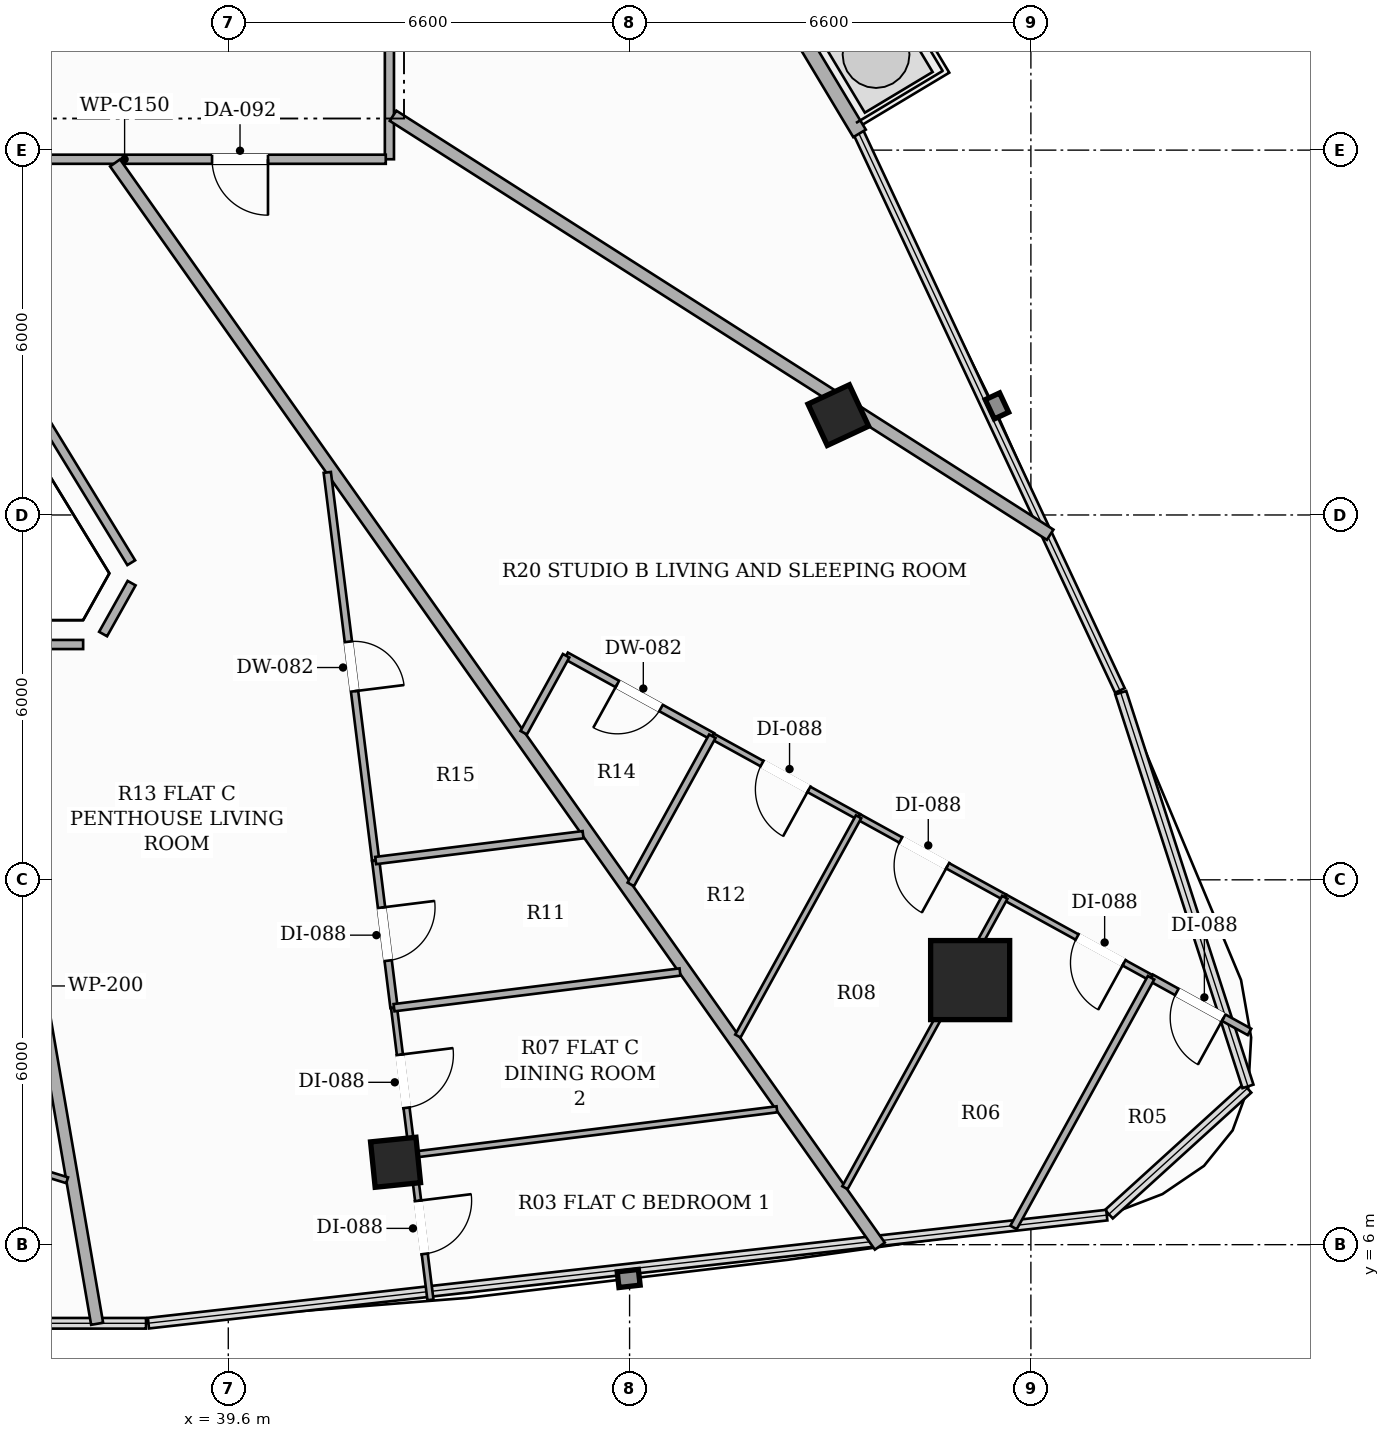
"""IFC4 building model, lengths in metres.
Left out: names, types, materials, properties, quantities, classifications, styles, units other than length and angle.
Written with IfcOpenShell. Run it as: python <this file> out.ifc"""

import sys

from ifc_helpers import new_model, si_unit, direction, frame, frame_2d, origin, origin_2d, place, context, subcontext, project, spatial, rectangle, hollow_rectangle, extrude, element, fill, save


model = new_model("IFC4")
c1 = context("Model", 3, precision=1e-05, world=origin(), true_north=direction((0.0, 1.0)))
c2 = subcontext(c1, "Body", "Model", "MODEL_VIEW")
j1 = project(units=[si_unit("LENGTHUNIT", "METRE"), si_unit("PLANEANGLEUNIT", "RADIAN")], contexts=[c1])
p1 = place(None, origin())
s1 = spatial("IfcSite", under=j1, at=p1, CompositionType="ELEMENT")
p2 = place(p1, origin())
s2 = spatial("IfcBuilding", under=s1, at=p2, CompositionType="ELEMENT")
p3 = place(p2, frame((0.0, 0.0, 209.6)))
s3 = spatial("IfcBuildingStorey", under=s2, at=p3, CompositionType="ELEMENT", Elevation=209.6)
p4 = place(p3, frame((51.801, 10.351, 0.0), z_axis=(0.0, 0.0, 1.0), x_axis=(1.0, 0.0, 0.0)))
e1 = element("IfcColumn", 1, at=p4, inside=s3, PredefinedType="COLUMN", context=c2, shape_type="SweptSolid", body=[
    extrude(hollow_rectangle(XDim=1.3, YDim=1.3, WallThickness=0.04, at=origin_2d()), origin(), (0.0, 0.0, 1.0), 3.3),
])
for number, where, z_axis, x_axis in (
    (2, (42.351, 7.355, 0.0), (0.0, 0.0, 1.0), (0.995, 0.101, 0.0)),
    (3, (49.633, 19.642, 0.0), (0.0, 0.0, 1.0), (-0.423, 0.906, 0.0)),
):
    element("IfcColumn", number, at=place(p3, frame(where, z_axis=z_axis, x_axis=x_axis)), inside=s3, PredefinedType="COLUMN", context=c2, shape_type="SweptSolid", body=[
        extrude(hollow_rectangle(XDim=0.75, YDim=0.75, WallThickness=0.025, at=origin_2d()), origin(), (0.0, 0.0, 1.0), 3.3),
    ])
p5 = place(p3, frame((49.982, 24.275, 0.0), z_axis=(0.0, 0.0, 1.0), x_axis=(-0.514391899557, 0.857555230682, 0.0)))
e4 = element("IfcWall", 4, at=p5, inside=s3, PredefinedType="SOLIDWALL", context=c2, shape_type="SweptSolid", body=[
    extrude(rectangle(XDim=10.371, YDim=0.24, at=frame_2d((5.186, 0.0))), origin(), (0.0, 0.0, 1.0), 2.624),
])
p6 = place(p5, frame((7.874, 0.0, 0.0)))
e5 = element("IfcOpeningElement", 5, at=p6, cuts=e4, PredefinedType="OPENING", context=c2, shape_type="SweptSolid", body=[
    extrude(rectangle(XDim=1.8, YDim=2.2, at=frame_2d((0.9, 1.1))), frame((0.0, 0.13, 0.0), z_axis=(0.0, -1.0, 0.0), x_axis=(1.0, 0.0, 0.0)), (0.0, 0.0, 1.0), 0.26),
])
p7 = place(p3, frame((42.25, 26.59, 0.0), z_axis=(0.0, 0.0, 1.0), x_axis=(0.0, -1.0, 0.0)))
e6 = element("IfcWall", 6, at=p7, inside=s3, PredefinedType="PARTITIONING", context=c2, shape_type="SweptSolid", body=[
    extrude(rectangle(XDim=2.74, YDim=0.15, at=frame_2d((1.37, 0.0))), origin(), (0.0, 0.0, 1.0), 2.773),
])
p8 = place(p3, frame((42.19, 23.85, 0.0), z_axis=(0.0, 0.0, 1.0), x_axis=(-1.0, 0.0, 0.0)))
e7 = element("IfcWall", 7, at=p8, inside=s3, PredefinedType="PARTITIONING", context=c2, shape_type="SweptSolid", body=[
    extrude(rectangle(XDim=8.24, YDim=0.15, at=frame_2d((4.12, 0.0))), origin(), (0.0, 0.0, 1.0), 2.565),
])
p9 = place(p8, frame((1.937, 0.0, 0.0)))
e8 = element("IfcOpeningElement", 8, at=p9, cuts=e7, PredefinedType="OPENING", context=c2, shape_type="SweptSolid", body=[
    extrude(rectangle(XDim=0.92, YDim=2.15, at=frame_2d((0.46, 1.075))), frame((0.0, 0.085, 0.0), z_axis=(0.0, -1.0, 0.0), x_axis=(1.0, 0.0, 0.0)), (0.0, 0.0, 1.0), 0.17),
])
p10 = place(p8, frame((5.733, 0.0, 0.0)))
e9 = element("IfcOpeningElement", 9, at=p10, cuts=e7, PredefinedType="OPENING", context=c2, shape_type="SweptSolid", body=[
    extrude(rectangle(XDim=0.92, YDim=2.15, at=frame_2d((0.46, 1.075))), frame((0.0, 0.085, 0.0), z_axis=(0.0, -1.0, 0.0), x_axis=(1.0, 0.0, 0.0)), (0.0, 0.0, 1.0), 0.17),
])
p11 = place(p3, frame((33.987, 23.79, 0.0), z_axis=(0.0, 0.0, 1.0), x_axis=(0.521338496894, -0.853349970209, 0.0)))
e10 = element("IfcWall", 10, at=p11, inside=s3, PredefinedType="PARTITIONING", context=c2, shape_type="SweptSolid", body=[
    extrude(rectangle(XDim=7.705, YDim=0.15, at=frame_2d((3.853, 0.0))), origin(), (0.0, 0.0, 1.0), 2.773),
])
p12 = place(p3, frame((38.01, 16.879, 0.0), z_axis=(0.0, 0.0, 1.0), x_axis=(-0.488859069364, -0.872362774481, 0.0)))
e11 = element("IfcWall", 11, at=p12, inside=s3, PredefinedType="PARTITIONING", context=c2, shape_type="SweptSolid", body=[
    extrude(rectangle(XDim=0.959, YDim=0.15, at=frame_2d((0.48, 0.0))), origin(), (0.0, 0.0, 1.0), 3.06),
])
p13 = place(p3, frame((37.213, 15.87, 0.0), z_axis=(0.0, 0.0, 1.0), x_axis=(-1.0, 0.0, 0.0)))
e12 = element("IfcWall", 12, at=p13, inside=s3, PredefinedType="PARTITIONING", context=c2, shape_type="SweptSolid", body=[
    extrude(rectangle(XDim=8.426, YDim=0.15, at=frame_2d((4.213, 0.0))), origin(), (0.0, 0.0, 1.0), 2.773),
])
p14 = place(p3, frame((35.53, 15.81, 0.0), z_axis=(0.0, 0.0, 1.0), x_axis=(0.169681394536, -0.985498972272, 0.0)))
e13 = element("IfcWall", 13, at=p14, inside=s3, PredefinedType="PARTITIONING", context=c2, shape_type="SweptSolid", body=[
    extrude(rectangle(XDim=11.275, YDim=0.2, at=frame_2d((5.637, 0.0))), origin(), (0.0, 0.0, 1.0), 2.492),
])
p15 = place(p3, frame((50.316, 5.976, 0.0), z_axis=(0.0, 0.0, 1.0), x_axis=(-0.576784728977, 0.816896184603, 0.0)))
e14 = element("IfcWall", 14, at=p15, inside=s3, PredefinedType="PARTITIONING", context=c2, shape_type="SweptSolid", body=[
    extrude(rectangle(XDim=21.807, YDim=0.2, at=frame_2d((10.903, 0.0))), origin(), (0.0, 0.0, 1.0), 2.492),
])
p16 = place(p3, frame((42.31, 24.565, 0.0), z_axis=(0.0, 0.0, 1.0), x_axis=(0.843209388644, -0.537585274075, 0.0)))
e15 = element("IfcWall", 15, at=p16, inside=s3, PredefinedType="PARTITIONING", context=c2, shape_type="SweptSolid", body=[
    extrude(rectangle(XDim=12.816, YDim=0.2, at=frame_2d((6.408, 0.0))), origin(), (0.0, 0.0, 1.0), 2.492),
])
p17 = place(p3, frame((29.459, 9.37, 0.0), z_axis=(0.0, 0.0, 1.0), x_axis=(0.955559226726, -0.294799193044, 0.0)))
e16 = element("IfcWall", 16, at=p17, inside=s3, PredefinedType="PARTITIONING", context=c2, shape_type="SweptSolid", body=[
    extrude(rectangle(XDim=7.839, YDim=0.1, at=frame_2d((3.92, 0.0))), origin(), (0.0, 0.0, 1.0), 2.492),
])
p18 = place(p3, frame((47.561, 14.361, 0.0), z_axis=(0.0, 0.0, 1.0), x_axis=(-0.876029965154, 0.482256674554, 0.0)))
e17 = element("IfcWall", 17, at=p18, inside=s3, PredefinedType="PARTITIONING", context=c2, shape_type="SweptSolid", body=[
    extrude(rectangle(XDim=2.745, YDim=0.12, at=frame_2d((1.373, 0.0))), origin(), (0.0, 0.0, 1.0), 3.06),
])
p19 = place(p18, frame((0.963, 0.0, 0.0)))
e18 = element("IfcOpeningElement", 18, at=p19, cuts=e17, PredefinedType="OPENING", context=c2, shape_type="SweptSolid", body=[
    extrude(rectangle(XDim=0.82, YDim=2.1, at=frame_2d((0.41, 1.05))), frame((0.0, 0.07, 0.0), z_axis=(0.0, -1.0, 0.0), x_axis=(1.0, 0.0, 0.0)), (0.0, 0.0, 1.0), 0.14),
])
p20 = place(p3, frame((45.156, 15.685, 0.0), z_axis=(0.0, 0.0, 1.0), x_axis=(-0.482268873401, -0.876023249548, 0.0)))
e19 = element("IfcWall", 19, at=p20, inside=s3, PredefinedType="PARTITIONING", context=c2, shape_type="SweptSolid", body=[
    extrude(rectangle(XDim=1.445, YDim=0.12, at=frame_2d((0.723, 0.0))), origin(), (0.0, 0.0, 1.0), 2.773),
])
p21 = place(p3, frame((56.395, 9.499, 0.0), z_axis=(0.0, 0.0, 1.0), x_axis=(-0.876137798995, 0.482060740128, 0.0)))
e20 = element("IfcWall", 20, at=p21, inside=s3, PredefinedType="PARTITIONING", context=c2, shape_type="SweptSolid", body=[
    extrude(rectangle(XDim=1.848, YDim=0.12, at=frame_2d((0.924, 0.0))), origin(), (0.0, 0.0, 1.0), 3.06),
])
p22 = place(p21, frame((0.484, 0.0, 0.0)))
e21 = element("IfcOpeningElement", 21, at=p22, cuts=e20, PredefinedType="OPENING", context=c2, shape_type="SweptSolid", body=[
    extrude(rectangle(XDim=0.88, YDim=2.1, at=frame_2d((0.44, 1.05))), frame((0.0, 0.07, 0.0), z_axis=(0.0, -1.0, 0.0), x_axis=(1.0, 0.0, 0.0)), (0.0, 0.0, 1.0), 0.14),
])
p23 = place(p3, frame((54.776, 10.39, 0.0), z_axis=(0.0, 0.0, 1.0), x_axis=(-0.876159561865, 0.48202118434, 0.0)))
e22 = element("IfcWall", 22, at=p23, inside=s3, PredefinedType="PARTITIONING", context=c2, shape_type="SweptSolid", body=[
    extrude(rectangle(XDim=2.745, YDim=0.1, at=frame_2d((1.372, 0.0))), origin(), (0.0, 0.0, 1.0), 3.06),
])
p24 = place(p23, frame((0.508, 0.0, 0.0)))
e23 = element("IfcOpeningElement", 23, at=p24, cuts=e22, PredefinedType="OPENING", context=c2, shape_type="SweptSolid", body=[
    extrude(rectangle(XDim=0.88, YDim=2.1, at=frame_2d((0.44, 1.05))), frame((0.0, 0.06, 0.0), z_axis=(0.0, -1.0, 0.0), x_axis=(1.0, 0.0, 0.0)), (0.0, 0.0, 1.0), 0.12),
])
p25 = place(p3, frame((52.371, 11.713, 0.0), z_axis=(0.0, 0.0, 1.0), x_axis=(-0.87599239457, 0.482324916064, 0.0)))
e24 = element("IfcWall", 24, at=p25, inside=s3, PredefinedType="PARTITIONING", context=c2, shape_type="SweptSolid", body=[
    extrude(rectangle(XDim=2.746, YDim=0.1, at=frame_2d((1.373, 0.0))), origin(), (0.0, 0.0, 1.0), 2.492),
])
p26 = place(p25, frame((1.074, 0.0, 0.0)))
e25 = element("IfcOpeningElement", 25, at=p26, cuts=e24, PredefinedType="OPENING", context=c2, shape_type="SweptSolid", body=[
    extrude(rectangle(XDim=0.88, YDim=2.1, at=frame_2d((0.44, 1.05))), frame((0.0, 0.06, 0.0), z_axis=(0.0, -1.0, 0.0), x_axis=(1.0, 0.0, 0.0)), (0.0, 0.0, 1.0), 0.12),
])
p27 = place(p3, frame((49.966, 13.037, 0.0), z_axis=(0.0, 0.0, 1.0), x_axis=(-0.876029965154, 0.482256674554, 0.0)))
e26 = element("IfcWall", 26, at=p27, inside=s3, PredefinedType="PARTITIONING", context=c2, shape_type="SweptSolid", body=[
    extrude(rectangle(XDim=2.745, YDim=0.1, at=frame_2d((1.373, 0.0))), origin(), (0.0, 0.0, 1.0), 2.565),
])
p28 = place(p27, frame((0.933, 0.0, 0.0)))
e27 = element("IfcOpeningElement", 27, at=p28, cuts=e26, PredefinedType="OPENING", context=c2, shape_type="SweptSolid", body=[
    extrude(rectangle(XDim=0.88, YDim=2.1, at=frame_2d((0.44, 1.05))), frame((0.0, 0.06, 0.0), z_axis=(0.0, -1.0, 0.0), x_axis=(1.0, 0.0, 0.0)), (0.0, 0.0, 1.0), 0.12),
])
p29 = place(p3, frame((47.561, 14.361, 0.0), z_axis=(0.0, 0.0, 1.0), x_axis=(-0.482262481374, -0.87602676846, 0.0)))
e28 = element("IfcWall", 28, at=p29, inside=s3, PredefinedType="PARTITIONING", context=c2, shape_type="SweptSolid", body=[
    extrude(rectangle(XDim=2.781, YDim=0.12, at=frame_2d((1.39, 0.0))), origin(), (0.0, 0.0, 1.0), 3.06),
])
p30 = place(p3, frame((52.515, 6.283, 0.0), z_axis=(0.0, 0.0, 1.0), x_axis=(0.482274545088, 0.876020127143, 0.0)))
e29 = element("IfcWall", 29, at=p30, inside=s3, PredefinedType="PARTITIONING", context=c2, shape_type="SweptSolid", body=[
    extrude(rectangle(XDim=4.688, YDim=0.12, at=frame_2d((2.344, 0.0))), origin(), (0.0, 0.0, 1.0), 3.06),
])
p31 = place(p3, frame((49.742, 6.937, 0.0), z_axis=(0.0, 0.0, 1.0), x_axis=(0.482259092216, 0.876028634221, 0.0)))
e30 = element("IfcWall", 30, at=p31, inside=s3, PredefinedType="PARTITIONING", context=c2, shape_type="SweptSolid", body=[
    extrude(rectangle(XDim=5.452, YDim=0.1, at=frame_2d((2.726, 0.0))), origin(), (0.0, 0.0, 1.0), 2.492),
])
p32 = place(p3, frame((47.981, 9.431, 0.0), z_axis=(0.0, 0.0, 1.0), x_axis=(0.482235180657, 0.876041797255, 0.0)))
e31 = element("IfcWall", 31, at=p32, inside=s3, PredefinedType="PARTITIONING", context=c2, shape_type="SweptSolid", body=[
    extrude(rectangle(XDim=4.116, YDim=0.1, at=frame_2d((2.058, 0.0))), origin(), (0.0, 0.0, 1.0), 2.492),
])
p33 = place(p3, frame((41.228, 18.7, 0.0), z_axis=(0.0, 0.0, 1.0), x_axis=(0.123731094195, -0.992315784581, 0.0)))
e32 = element("IfcWall", 32, at=p33, inside=s3, PredefinedType="PARTITIONING", context=c2, shape_type="SweptSolid", body=[
    extrude(rectangle(XDim=6.432, YDim=0.12, at=frame_2d((3.216, 0.0))), origin(), (0.0, 0.0, 1.0), 3.06),
])
p34 = place(p33, frame((2.806, 0.0, 0.0)))
e33 = element("IfcOpeningElement", 33, at=p34, cuts=e32, PredefinedType="OPENING", context=c2, shape_type="SweptSolid", body=[
    extrude(rectangle(XDim=0.82, YDim=2.1, at=frame_2d((0.41, 1.05))), frame((0.0, 0.07, 0.0), z_axis=(0.0, -1.0, 0.0), x_axis=(1.0, 0.0, 0.0)), (0.0, 0.0, 1.0), 0.14),
])
p35 = place(p3, frame((42.024, 12.317, 0.0), z_axis=(0.0, 0.0, 1.0), x_axis=(0.123837590029, -0.992302499894, 0.0)))
e34 = element("IfcWall", 34, at=p35, inside=s3, PredefinedType="PARTITIONING", context=c2, shape_type="SweptSolid", body=[
    extrude(rectangle(XDim=2.439, YDim=0.12, at=frame_2d((1.219, 0.0))), origin(), (0.0, 0.0, 1.0), 3.06),
])
p36 = place(p35, frame((0.779, 0.0, 0.0)))
e35 = element("IfcOpeningElement", 35, at=p36, cuts=e34, PredefinedType="OPENING", context=c2, shape_type="SweptSolid", body=[
    extrude(rectangle(XDim=0.88, YDim=2.1, at=frame_2d((0.44, 1.05))), frame((0.0, 0.07, 0.0), z_axis=(0.0, -1.0, 0.0), x_axis=(1.0, 0.0, 0.0)), (0.0, 0.0, 1.0), 0.14),
])
p37 = place(p3, frame((42.628, 7.478, 0.0), z_axis=(0.0, 0.0, 1.0), x_axis=(0.123572330504, -0.992335567806, 0.0)))
e36 = element("IfcWall", 36, at=p37, inside=s3, PredefinedType="PARTITIONING", context=c2, shape_type="SweptSolid", body=[
    extrude(rectangle(XDim=2.404, YDim=0.1, at=frame_2d((1.202, 0.0))), origin(), (0.0, 0.0, 1.0), 2.492),
])
p38 = place(p37, frame((0.762, 0.0, 0.0)))
e37 = element("IfcOpeningElement", 37, at=p38, cuts=e36, PredefinedType="OPENING", context=c2, shape_type="SweptSolid", body=[
    extrude(rectangle(XDim=0.88, YDim=2.1, at=frame_2d((0.44, 1.05))), frame((0.0, 0.06, 0.0), z_axis=(0.0, -1.0, 0.0), x_axis=(1.0, 0.0, 0.0)), (0.0, 0.0, 1.0), 0.12),
])
p39 = place(p3, frame((42.326, 9.897, 0.0), z_axis=(0.0, 0.0, 1.0), x_axis=(0.123886817851, -0.992296355109, 0.0)))
e38 = element("IfcWall", 38, at=p39, inside=s3, PredefinedType="PARTITIONING", context=c2, shape_type="SweptSolid", body=[
    extrude(rectangle(XDim=2.438, YDim=0.1, at=frame_2d((1.219, 0.0))), origin(), (0.0, 0.0, 1.0), 2.492),
])
p40 = place(p39, frame((0.779, 0.0, 0.0)))
e39 = element("IfcOpeningElement", 39, at=p40, cuts=e38, PredefinedType="OPENING", context=c2, shape_type="SweptSolid", body=[
    extrude(rectangle(XDim=0.88, YDim=2.1, at=frame_2d((0.44, 1.05))), frame((0.0, 0.06, 0.0), z_axis=(0.0, -1.0, 0.0), x_axis=(1.0, 0.0, 0.0)), (0.0, 0.0, 1.0), 0.12),
])
p41 = place(p3, frame((45.435, 12.742, 0.0), z_axis=(0.0, 0.0, 1.0), x_axis=(-0.99232587892, -0.123650111308, 0.0)))
e40 = element("IfcWall", 40, at=p41, inside=s3, PredefinedType="PARTITIONING", context=c2, shape_type="SweptSolid", body=[
    extrude(rectangle(XDim=3.438, YDim=0.12, at=frame_2d((1.719, 0.0))), origin(), (0.0, 0.0, 1.0), 2.773),
])
p42 = place(p3, frame((47.029, 10.484, 0.0), z_axis=(0.0, 0.0, 1.0), x_axis=(-0.992303215116, -0.123831858863, 0.0)))
e41 = element("IfcWall", 41, at=p42, inside=s3, PredefinedType="PARTITIONING", context=c2, shape_type="SweptSolid", body=[
    extrude(rectangle(XDim=4.74, YDim=0.12, at=frame_2d((2.37, 0.0))), origin(), (0.0, 0.0, 1.0), 2.773),
])
p43 = place(p3, frame((42.628, 7.478, 0.0), z_axis=(0.0, 0.0, 1.0), x_axis=(0.992305206969, 0.123815896488, 0.0)))
e42 = element("IfcWall", 42, at=p43, inside=s3, PredefinedType="PARTITIONING", context=c2, shape_type="SweptSolid", body=[
    extrude(rectangle(XDim=6.042, YDim=0.1, at=frame_2d((3.021, 0.0))), origin(), (0.0, 0.0, 1.0), 2.492),
])
p44 = place(p9, origin())
e43 = element("IfcDoor", 43, at=p44, inside=s3, OperationType="SINGLE_SWING_LEFT", PredefinedType="DOOR", context=c2, shape_type="SweptSolid", body=[
    extrude(rectangle(XDim=0.92, YDim=2.15, at=frame_2d((0.46, 1.075))), frame((0.0, 0.025, 0.0), z_axis=(0.0, -1.0, 0.0), x_axis=(1.0, 0.0, 0.0)), (0.0, 0.0, 1.0), 0.05),
])
fill(e8, e43)
p45 = place(p19, origin())
e44 = element("IfcDoor", 44, at=p45, inside=s3, OperationType="SINGLE_SWING_RIGHT", PredefinedType="DOOR", context=c2, shape_type="SweptSolid", body=[
    extrude(rectangle(XDim=0.82, YDim=2.1, at=frame_2d((0.41, 1.05))), frame((0.0, 0.025, 0.0), z_axis=(0.0, -1.0, 0.0), x_axis=(1.0, 0.0, 0.0)), (0.0, 0.0, 1.0), 0.05),
])
fill(e18, e44)
p46 = place(p22, origin())
e45 = element("IfcDoor", 45, at=p46, inside=s3, OperationType="SINGLE_SWING_LEFT", PredefinedType="DOOR", context=c2, shape_type="SweptSolid", body=[
    extrude(rectangle(XDim=0.88, YDim=2.1, at=frame_2d((0.44, 1.05))), frame((0.0, 0.025, 0.0), z_axis=(0.0, -1.0, 0.0), x_axis=(1.0, 0.0, 0.0)), (0.0, 0.0, 1.0), 0.05),
])
fill(e21, e45)
p47 = place(p24, origin())
e46 = element("IfcDoor", 46, at=p47, inside=s3, OperationType="SINGLE_SWING_LEFT", PredefinedType="DOOR", context=c2, shape_type="SweptSolid", body=[
    extrude(rectangle(XDim=0.88, YDim=2.1, at=frame_2d((0.44, 1.05))), frame((0.0, 0.025, 0.0), z_axis=(0.0, -1.0, 0.0), x_axis=(1.0, 0.0, 0.0)), (0.0, 0.0, 1.0), 0.05),
])
fill(e23, e46)
p48 = place(p26, origin())
e47 = element("IfcDoor", 47, at=p48, inside=s3, OperationType="SINGLE_SWING_LEFT", PredefinedType="DOOR", context=c2, shape_type="SweptSolid", body=[
    extrude(rectangle(XDim=0.88, YDim=2.1, at=frame_2d((0.44, 1.05))), frame((0.0, 0.025, 0.0), z_axis=(0.0, -1.0, 0.0), x_axis=(1.0, 0.0, 0.0)), (0.0, 0.0, 1.0), 0.05),
])
fill(e25, e47)
p49 = place(p28, origin())
e48 = element("IfcDoor", 48, at=p49, inside=s3, OperationType="SINGLE_SWING_LEFT", PredefinedType="DOOR", context=c2, shape_type="SweptSolid", body=[
    extrude(rectangle(XDim=0.88, YDim=2.1, at=frame_2d((0.44, 1.05))), frame((0.0, 0.025, 0.0), z_axis=(0.0, -1.0, 0.0), x_axis=(1.0, 0.0, 0.0)), (0.0, 0.0, 1.0), 0.05),
])
fill(e27, e48)
p50 = place(p34, origin())
e49 = element("IfcDoor", 49, at=p50, inside=s3, OperationType="SINGLE_SWING_RIGHT", PredefinedType="DOOR", context=c2, shape_type="SweptSolid", body=[
    extrude(rectangle(XDim=0.82, YDim=2.1, at=frame_2d((0.41, 1.05))), frame((0.0, 0.025, 0.0), z_axis=(0.0, -1.0, 0.0), x_axis=(1.0, 0.0, 0.0)), (0.0, 0.0, 1.0), 0.05),
])
fill(e33, e49)
p51 = place(p36, origin())
e50 = element("IfcDoor", 50, at=p51, inside=s3, OperationType="SINGLE_SWING_LEFT", PredefinedType="DOOR", context=c2, shape_type="SweptSolid", body=[
    extrude(rectangle(XDim=0.88, YDim=2.1, at=frame_2d((0.44, 1.05))), frame((0.0, 0.025, 0.0), z_axis=(0.0, -1.0, 0.0), x_axis=(1.0, 0.0, 0.0)), (0.0, 0.0, 1.0), 0.05),
])
fill(e35, e50)
p52 = place(p38, origin())
e51 = element("IfcDoor", 51, at=p52, inside=s3, OperationType="SINGLE_SWING_LEFT", PredefinedType="DOOR", context=c2, shape_type="SweptSolid", body=[
    extrude(rectangle(XDim=0.88, YDim=2.1, at=frame_2d((0.44, 1.05))), frame((0.0, 0.025, 0.0), z_axis=(0.0, -1.0, 0.0), x_axis=(1.0, 0.0, 0.0)), (0.0, 0.0, 1.0), 0.05),
])
fill(e37, e51)
p53 = place(p40, origin())
e52 = element("IfcDoor", 52, at=p53, inside=s3, OperationType="SINGLE_SWING_LEFT", PredefinedType="DOOR", context=c2, shape_type="SweptSolid", body=[
    extrude(rectangle(XDim=0.88, YDim=2.1, at=frame_2d((0.44, 1.05))), frame((0.0, 0.025, 0.0), z_axis=(0.0, -1.0, 0.0), x_axis=(1.0, 0.0, 0.0)), (0.0, 0.0, 1.0), 0.05),
])
fill(e39, e52)
save(model, sys.argv[1])
